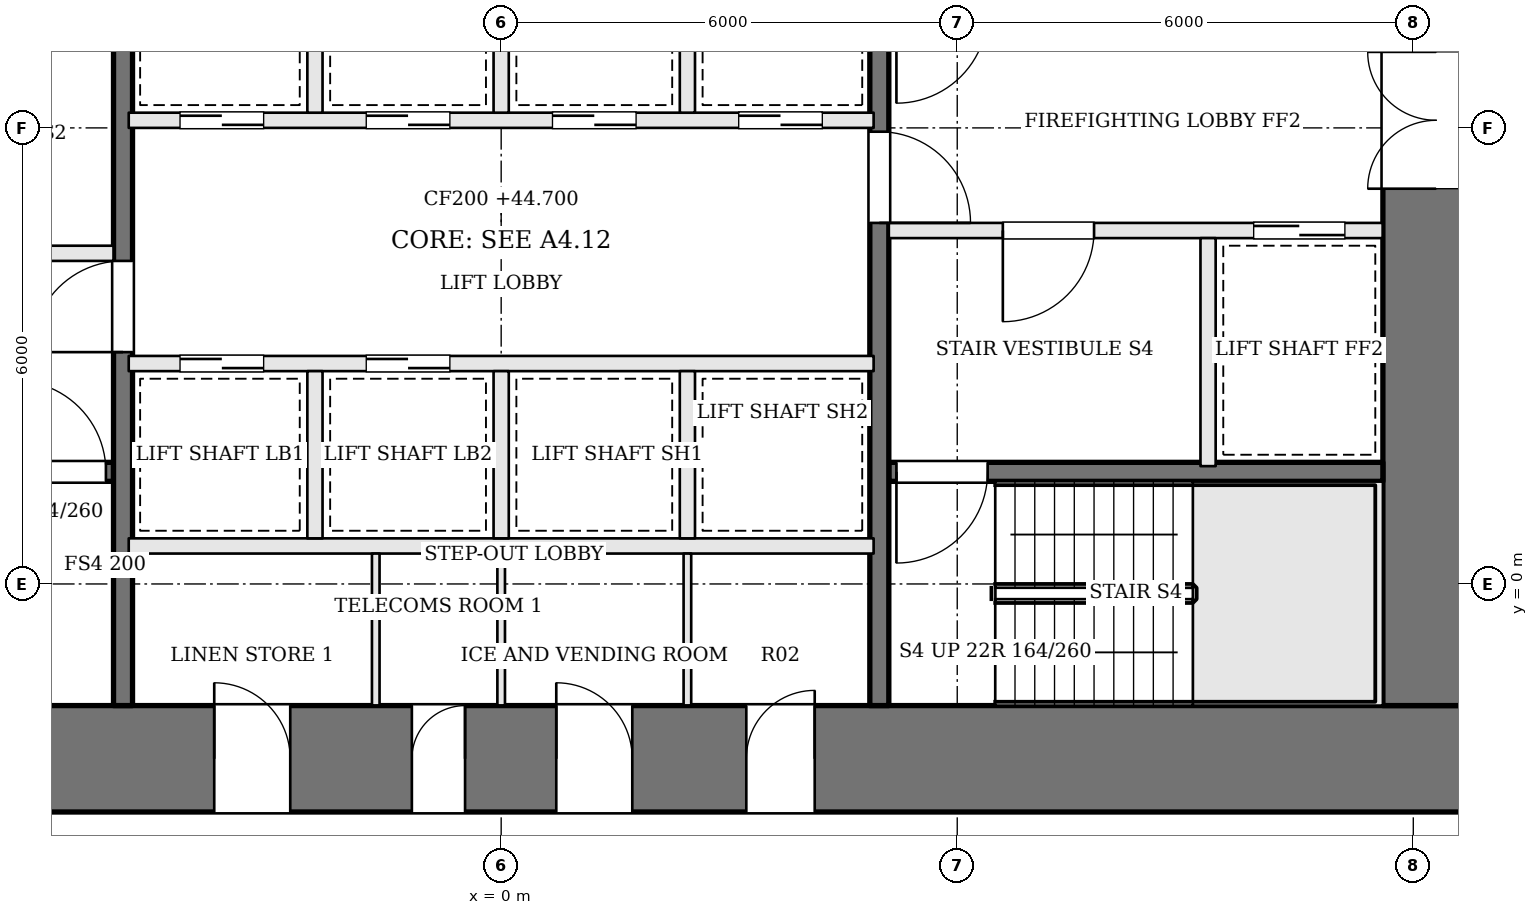
"""IFC4 building model, lengths in metres.
Left out: names, types, materials, properties, quantities, classifications, styles, units other than length and angle.
Written with IfcOpenShell. Run it as: python <this file> out.ifc"""

import sys

from ifc_helpers import new_model, si_unit, direction, frame, frame_2d, origin, place, context, subcontext, project, spatial, rectangle, extrude, element, fill, save


model = new_model("IFC4")
c1 = context("Model", 3, precision=1e-05, world=origin(), true_north=direction((0.0, 1.0)))
c2 = subcontext(c1, "Body", "Model", "MODEL_VIEW")
j1 = project(units=[si_unit("LENGTHUNIT", "METRE"), si_unit("PLANEANGLEUNIT", "RADIAN")], contexts=[c1])
p1 = place(None, origin())
s1 = spatial("IfcSite", under=j1, at=p1, CompositionType="ELEMENT")
p2 = place(p1, origin())
s2 = spatial("IfcBuilding", under=s1, at=p2, CompositionType="ELEMENT")
p3 = place(p2, frame((0.0, 0.0, 44.7)))
s3 = spatial("IfcBuildingStorey", under=s2, at=p3, CompositionType="ELEMENT", Elevation=44.7)
p4 = place(p3, frame((-13.0, -2.3, 0.0), z_axis=(0.0, 0.0, 1.0), x_axis=(1.0, 0.0, 0.0)))
e1 = element("IfcWall", 1, at=p4, inside=s3, PredefinedType="SHEAR", context=c2, shape_type="SweptSolid", body=[
    extrude(rectangle(XDim=26.0, YDim=1.4, at=frame_2d((13.0, 0.0))), origin(), (0.0, 0.0, 1.0), 3.6),
])
p5 = place(p4, frame((9.225, 0.0, 0.0)))
e2 = element("IfcOpeningElement", 2, at=p5, cuts=e1, PredefinedType="OPENING", context=c2, shape_type="SweptSolid", body=[
    extrude(rectangle(XDim=1.0, YDim=2.1, at=frame_2d((0.5, 1.05))), frame((0.0, 0.71, 0.0), z_axis=(0.0, -1.0, 0.0), x_axis=(1.0, 0.0, 0.0)), (0.0, 0.0, 1.0), 1.42),
])
p6 = place(p4, frame((11.825, 0.0, 0.0)))
e3 = element("IfcOpeningElement", 3, at=p6, cuts=e1, PredefinedType="OPENING", context=c2, shape_type="SweptSolid", body=[
    extrude(rectangle(XDim=0.7, YDim=2.1, at=frame_2d((0.35, 1.05))), frame((0.0, 0.71, 0.0), z_axis=(0.0, -1.0, 0.0), x_axis=(1.0, 0.0, 0.0)), (0.0, 0.0, 1.0), 1.42),
])
p7 = place(p4, frame((13.725, 0.0, 0.0)))
e4 = element("IfcOpeningElement", 4, at=p7, cuts=e1, PredefinedType="OPENING", context=c2, shape_type="SweptSolid", body=[
    extrude(rectangle(XDim=1.0, YDim=2.1, at=frame_2d((0.5, 1.05))), frame((0.0, 0.71, 0.0), z_axis=(0.0, -1.0, 0.0), x_axis=(1.0, 0.0, 0.0)), (0.0, 0.0, 1.0), 1.42),
])
p8 = place(p4, frame((16.225, 0.0, 0.0)))
e5 = element("IfcOpeningElement", 5, at=p8, cuts=e1, PredefinedType="OPENING", context=c2, shape_type="SweptSolid", body=[
    extrude(rectangle(XDim=0.9, YDim=2.1, at=frame_2d((0.45, 1.05))), frame((0.0, 0.71, 0.0), z_axis=(0.0, -1.0, 0.0), x_axis=(1.0, 0.0, 0.0)), (0.0, 0.0, 1.0), 1.42),
])
p9 = place(p3, frame((12.3, -1.6, 0.0), z_axis=(0.0, 0.0, 1.0), x_axis=(0.0, 1.0, 0.0)))
e6 = element("IfcWall", 6, at=p9, inside=s3, PredefinedType="SHEAR", context=c2, shape_type="SweptSolid", body=[
    extrude(rectangle(XDim=12.2, YDim=1.4, at=frame_2d((6.1, 0.0))), origin(), (0.0, 0.0, 1.0), 3.6),
])
p10 = place(p9, frame((6.8, 0.0, 0.0)))
e7 = element("IfcOpeningElement", 7, at=p10, cuts=e6, PredefinedType="OPENING", context=c2, shape_type="SweptSolid", body=[
    extrude(rectangle(XDim=1.8, YDim=2.1, at=frame_2d((0.9, 1.05))), frame((0.0, 0.71, 0.0), z_axis=(0.0, -1.0, 0.0), x_axis=(1.0, 0.0, 0.0)), (0.0, 0.0, 1.0), 1.42),
])
p11 = place(p3, frame((-11.6, 1.475, 0.0), z_axis=(0.0, 0.0, 1.0), x_axis=(1.0, 0.0, 0.0)))
e8 = element("IfcWall", 8, at=p11, inside=s3, PredefinedType="SOLIDWALL", context=c2, shape_type="SweptSolid", body=[
    extrude(rectangle(XDim=6.5, YDim=0.25, at=frame_2d((3.25, 0.0))), origin(), (0.0, 0.0, 1.0), 3.4),
])
p12 = place(p11, frame((5.2, 0.0, 0.0)))
e9 = element("IfcOpeningElement", 9, at=p12, cuts=e8, PredefinedType="OPENING", context=c2, shape_type="SweptSolid", body=[
    extrude(rectangle(XDim=1.2, YDim=2.1, at=frame_2d((0.6, 1.05))), frame((0.0, 0.135, 0.0), z_axis=(0.0, -1.0, 0.0), x_axis=(1.0, 0.0, 0.0)), (0.0, 0.0, 1.0), 0.27),
])
p13 = place(p3, frame((-11.6, 4.35, 0.0), z_axis=(0.0, 0.0, 1.0), x_axis=(1.0, 0.0, 0.0)))
e10 = element("IfcWall", 10, at=p13, inside=s3, PredefinedType="SOLIDWALL", context=c2, shape_type="SweptSolid", body=[
    extrude(rectangle(XDim=6.5, YDim=0.2, at=frame_2d((3.25, 0.0))), origin(), (0.0, 0.0, 1.0), 3.4),
])
p14 = place(p13, frame((3.8, 0.0, 0.0)))
e11 = element("IfcOpeningElement", 11, at=p14, cuts=e10, PredefinedType="OPENING", context=c2, shape_type="SweptSolid", body=[
    extrude(rectangle(XDim=1.2, YDim=2.1, at=frame_2d((0.6, 1.05))), frame((0.0, 0.11, 0.0), z_axis=(0.0, -1.0, 0.0), x_axis=(1.0, 0.0, 0.0)), (0.0, 0.0, 1.0), 0.22),
])
p15 = place(p13, frame((0.5, 0.0, 0.0)))
e12 = element("IfcOpeningElement", 12, at=p15, cuts=e10, PredefinedType="OPENING", context=c2, shape_type="SweptSolid", body=[
    extrude(rectangle(XDim=1.2, YDim=2.1, at=frame_2d((0.6, 1.05))), frame((0.0, 0.11, 0.0), z_axis=(0.0, -1.0, 0.0), x_axis=(1.0, 0.0, 0.0)), (0.0, 0.0, 1.0), 0.22),
])
p16 = place(p3, frame((11.6, 4.65, 0.0), z_axis=(0.0, 0.0, 1.0), x_axis=(-1.0, 0.0, 0.0)))
e13 = element("IfcWall", 13, at=p16, inside=s3, PredefinedType="SOLIDWALL", context=c2, shape_type="SweptSolid", body=[
    extrude(rectangle(XDim=6.5, YDim=0.2, at=frame_2d((3.25, 0.0))), origin(), (0.0, 0.0, 1.0), 3.4),
])
p17 = place(p16, frame((3.8, 0.0, 0.0)))
e14 = element("IfcOpeningElement", 14, at=p17, cuts=e13, PredefinedType="OPENING", context=c2, shape_type="SweptSolid", body=[
    extrude(rectangle(XDim=1.2, YDim=2.1, at=frame_2d((0.6, 1.05))), frame((0.0, 0.11, 0.0), z_axis=(0.0, -1.0, 0.0), x_axis=(1.0, 0.0, 0.0)), (0.0, 0.0, 1.0), 0.22),
])
p18 = place(p16, frame((0.5, 0.0, 0.0)))
e15 = element("IfcOpeningElement", 15, at=p18, cuts=e13, PredefinedType="OPENING", context=c2, shape_type="SweptSolid", body=[
    extrude(rectangle(XDim=1.2, YDim=2.1, at=frame_2d((0.6, 1.05))), frame((0.0, 0.11, 0.0), z_axis=(0.0, -1.0, 0.0), x_axis=(1.0, 0.0, 0.0)), (0.0, 0.0, 1.0), 0.22),
])
p19 = place(p3, frame((11.6, 1.475, 0.0), z_axis=(0.0, 0.0, 1.0), x_axis=(-1.0, 0.0, 0.0)))
e16 = element("IfcWall", 16, at=p19, inside=s3, PredefinedType="SOLIDWALL", context=c2, shape_type="SweptSolid", body=[
    extrude(rectangle(XDim=6.5, YDim=0.25, at=frame_2d((3.25, 0.0))), origin(), (0.0, 0.0, 1.0), 3.4),
])
p20 = place(p19, frame((5.2, 0.0, 0.0)))
e17 = element("IfcOpeningElement", 17, at=p20, cuts=e16, PredefinedType="OPENING", context=c2, shape_type="SweptSolid", body=[
    extrude(rectangle(XDim=1.2, YDim=2.1, at=frame_2d((0.6, 1.05))), frame((0.0, 0.135, 0.0), z_axis=(0.0, -1.0, 0.0), x_axis=(1.0, 0.0, 0.0)), (0.0, 0.0, 1.0), 0.27),
])
p21 = place(p3, frame((9.3, 4.55, 0.0), z_axis=(0.0, 0.0, 1.0), x_axis=(0.0, -1.0, 0.0)))
e18 = element("IfcWall", 18, at=p21, inside=s3, PredefinedType="SOLIDWALL", context=c2, shape_type="SweptSolid", body=[
    extrude(rectangle(XDim=3.0, YDim=0.2, at=frame_2d((1.5, 0.0))), origin(), (0.0, 0.0, 1.0), 3.4),
])
p22 = place(p3, frame((-4.975, -1.6, 0.0), z_axis=(0.0, 0.0, 1.0), x_axis=(0.0, 1.0, 0.0)))
e19 = element("IfcWall", 19, at=p22, inside=s3, PredefinedType="SOLIDWALL", context=c2, shape_type="SweptSolid", body=[
    extrude(rectangle(XDim=12.2, YDim=0.25, at=frame_2d((6.1, 0.0))), origin(), (0.0, 0.0, 1.0), 3.4),
])
p23 = place(p22, frame((4.65, 0.0, 0.0)))
e20 = element("IfcOpeningElement", 20, at=p23, cuts=e19, PredefinedType="OPENING", context=c2, shape_type="SweptSolid", body=[
    extrude(rectangle(XDim=1.2, YDim=2.1, at=frame_2d((0.6, 1.05))), frame((0.0, 0.135, 0.0), z_axis=(0.0, -1.0, 0.0), x_axis=(1.0, 0.0, 0.0)), (0.0, 0.0, 1.0), 0.27),
])
p24 = place(p3, frame((4.975, 10.6, 0.0), z_axis=(0.0, 0.0, 1.0), x_axis=(0.0, -1.0, 0.0)))
e21 = element("IfcWall", 21, at=p24, inside=s3, PredefinedType="SOLIDWALL", context=c2, shape_type="SweptSolid", body=[
    extrude(rectangle(XDim=12.2, YDim=0.25, at=frame_2d((6.1, 0.0))), origin(), (0.0, 0.0, 1.0), 3.4),
])
p25 = place(p24, frame((4.65, 0.0, 0.0)))
e22 = element("IfcOpeningElement", 22, at=p25, cuts=e21, PredefinedType="OPENING", context=c2, shape_type="SweptSolid", body=[
    extrude(rectangle(XDim=1.2, YDim=2.1, at=frame_2d((0.6, 1.05))), frame((0.0, 0.135, 0.0), z_axis=(0.0, -1.0, 0.0), x_axis=(1.0, 0.0, 0.0)), (0.0, 0.0, 1.0), 0.27),
])
p26 = place(p3, frame((-4.9, 0.5, 0.0), z_axis=(0.0, 0.0, 1.0), x_axis=(1.0, 0.0, 0.0)))
e23 = element("IfcWall", 23, at=p26, inside=s3, PredefinedType="SOLIDWALL", context=c2, shape_type="SweptSolid", body=[
    extrude(rectangle(XDim=9.8, YDim=0.2, at=frame_2d((4.9, 0.0))), origin(), (0.0, 0.0, 1.0), 3.4),
])
p27 = place(p3, frame((-4.9, 2.9, 0.0), z_axis=(0.0, 0.0, 1.0), x_axis=(1.0, 0.0, 0.0)))
e24 = element("IfcWall", 24, at=p27, inside=s3, PredefinedType="SOLIDWALL", context=c2, shape_type="SweptSolid", body=[
    extrude(rectangle(XDim=9.8, YDim=0.2, at=frame_2d((4.9, 0.0))), origin(), (0.0, 0.0, 1.0), 3.4),
])
p28 = place(p27, frame((0.675, 0.0, 0.0)))
e25 = element("IfcOpeningElement", 25, at=p28, cuts=e24, PredefinedType="OPENING", context=c2, shape_type="SweptSolid", body=[
    extrude(rectangle(XDim=1.1, YDim=2.1, at=frame_2d((0.55, 1.05))), frame((0.0, 0.11, 0.0), z_axis=(0.0, -1.0, 0.0), x_axis=(1.0, 0.0, 0.0)), (0.0, 0.0, 1.0), 0.22),
])
p29 = place(p27, frame((3.125, 0.0, 0.0)))
e26 = element("IfcOpeningElement", 26, at=p29, cuts=e24, PredefinedType="OPENING", context=c2, shape_type="SweptSolid", body=[
    extrude(rectangle(XDim=1.1, YDim=2.1, at=frame_2d((0.55, 1.05))), frame((0.0, 0.11, 0.0), z_axis=(0.0, -1.0, 0.0), x_axis=(1.0, 0.0, 0.0)), (0.0, 0.0, 1.0), 0.22),
])
p30 = place(p3, frame((-4.9, 6.1, 0.0), z_axis=(0.0, 0.0, 1.0), x_axis=(1.0, 0.0, 0.0)))
e27 = element("IfcWall", 27, at=p30, inside=s3, PredefinedType="SOLIDWALL", context=c2, shape_type="SweptSolid", body=[
    extrude(rectangle(XDim=9.8, YDim=0.2, at=frame_2d((4.9, 0.0))), origin(), (0.0, 0.0, 1.0), 3.4),
])
p31 = place(p30, frame((0.675, 0.0, 0.0)))
e28 = element("IfcOpeningElement", 28, at=p31, cuts=e27, PredefinedType="OPENING", context=c2, shape_type="SweptSolid", body=[
    extrude(rectangle(XDim=1.1, YDim=2.1, at=frame_2d((0.55, 1.05))), frame((0.0, 0.11, 0.0), z_axis=(0.0, -1.0, 0.0), x_axis=(1.0, 0.0, 0.0)), (0.0, 0.0, 1.0), 0.22),
])
p32 = place(p30, frame((3.125, 0.0, 0.0)))
e29 = element("IfcOpeningElement", 29, at=p32, cuts=e27, PredefinedType="OPENING", context=c2, shape_type="SweptSolid", body=[
    extrude(rectangle(XDim=1.1, YDim=2.1, at=frame_2d((0.55, 1.05))), frame((0.0, 0.11, 0.0), z_axis=(0.0, -1.0, 0.0), x_axis=(1.0, 0.0, 0.0)), (0.0, 0.0, 1.0), 0.22),
])
p33 = place(p30, frame((5.575, 0.0, 0.0)))
e30 = element("IfcOpeningElement", 30, at=p33, cuts=e27, PredefinedType="OPENING", context=c2, shape_type="SweptSolid", body=[
    extrude(rectangle(XDim=1.1, YDim=2.1, at=frame_2d((0.55, 1.05))), frame((0.0, 0.11, 0.0), z_axis=(0.0, -1.0, 0.0), x_axis=(1.0, 0.0, 0.0)), (0.0, 0.0, 1.0), 0.22),
])
p34 = place(p30, frame((8.025, 0.0, 0.0)))
e31 = element("IfcOpeningElement", 31, at=p34, cuts=e27, PredefinedType="OPENING", context=c2, shape_type="SweptSolid", body=[
    extrude(rectangle(XDim=1.1, YDim=2.1, at=frame_2d((0.55, 1.05))), frame((0.0, 0.11, 0.0), z_axis=(0.0, -1.0, 0.0), x_axis=(1.0, 0.0, 0.0)), (0.0, 0.0, 1.0), 0.22),
])
for number, where, z_axis, x_axis in (
    (32, (-2.45, 0.6, 0.0), (0.0, 0.0, 1.0), (0.0, 1.0, 0.0)),
    (33, (0.0, 0.6, 0.0), (0.0, 0.0, 1.0), (0.0, 1.0, 0.0)),
    (34, (2.45, 0.6, 0.0), (0.0, 0.0, 1.0), (0.0, 1.0, 0.0)),
    (35, (-2.45, 6.2, 0.0), (0.0, 0.0, 1.0), (0.0, 1.0, 0.0)),
    (36, (0.0, 6.2, 0.0), (0.0, 0.0, 1.0), (0.0, 1.0, 0.0)),
    (37, (2.45, 6.2, 0.0), (0.0, 0.0, 1.0), (0.0, 1.0, 0.0)),
):
    element("IfcWall", number, at=place(p3, frame(where, z_axis=z_axis, x_axis=x_axis)), inside=s3, PredefinedType="SOLIDWALL", context=c2, shape_type="SweptSolid", body=[
        extrude(rectangle(XDim=2.2, YDim=0.2, at=frame_2d((1.1, 0.0))), origin(), (0.0, 0.0, 1.0), 3.4),
    ])
for number, where, z_axis, x_axis in (
    (38, (-1.65, -1.6, 0.0), (0.0, 0.0, 1.0), (0.0, 1.0, 0.0)),
    (39, (0.0, -1.6, 0.0), (0.0, 0.0, 1.0), (0.0, 1.0, 0.0)),
    (40, (2.45, -1.6, 0.0), (0.0, 0.0, 1.0), (0.0, 1.0, 0.0)),
):
    element("IfcWall", number, at=place(p3, frame(where, z_axis=z_axis, x_axis=x_axis)), inside=s3, PredefinedType="PARTITIONING", context=c2, shape_type="SweptSolid", body=[
        extrude(rectangle(XDim=2.0, YDim=0.1, at=frame_2d((1.0, 0.0))), origin(), (0.0, 0.0, 1.0), 3.4),
    ])
p35 = place(p10, origin())
e41 = element("IfcDoor", 41, at=p35, inside=s3, OperationType="DOUBLE_DOOR_SINGLE_SWING", PredefinedType="DOOR", context=c2, shape_type="SweptSolid", body=[
    extrude(rectangle(XDim=1.8, YDim=2.1, at=frame_2d((0.9, 1.05))), frame((0.0, 0.025, 0.0), z_axis=(0.0, -1.0, 0.0), x_axis=(1.0, 0.0, 0.0)), (0.0, 0.0, 1.0), 0.05),
])
fill(e7, e41)
p36 = place(p23, origin())
e42 = element("IfcDoor", 42, at=p36, inside=s3, OperationType="SINGLE_SWING_LEFT", PredefinedType="DOOR", context=c2, shape_type="SweptSolid", body=[
    extrude(rectangle(XDim=1.2, YDim=2.1, at=frame_2d((0.6, 1.05))), frame((0.0, 0.025, 0.0), z_axis=(0.0, -1.0, 0.0), x_axis=(1.0, 0.0, 0.0)), (0.0, 0.0, 1.0), 0.05),
])
fill(e20, e42)
p37 = place(p25, origin())
e43 = element("IfcDoor", 43, at=p37, inside=s3, OperationType="SINGLE_SWING_RIGHT", PredefinedType="DOOR", context=c2, shape_type="SweptSolid", body=[
    extrude(rectangle(XDim=1.2, YDim=2.1, at=frame_2d((0.6, 1.05))), frame((0.0, 0.025, 0.0), z_axis=(0.0, -1.0, 0.0), x_axis=(1.0, 0.0, 0.0)), (0.0, 0.0, 1.0), 0.05),
])
fill(e22, e43)
p38 = place(p17, origin())
e44 = element("IfcDoor", 44, at=p38, inside=s3, OperationType="SINGLE_SWING_RIGHT", PredefinedType="DOOR", context=c2, shape_type="SweptSolid", body=[
    extrude(rectangle(XDim=1.2, YDim=2.1, at=frame_2d((0.6, 1.05))), frame((0.0, 0.025, 0.0), z_axis=(0.0, -1.0, 0.0), x_axis=(1.0, 0.0, 0.0)), (0.0, 0.0, 1.0), 0.05),
])
fill(e14, e44)
p39 = place(p12, origin())
e45 = element("IfcDoor", 45, at=p39, inside=s3, OperationType="SINGLE_SWING_LEFT", PredefinedType="DOOR", context=c2, shape_type="SweptSolid", body=[
    extrude(rectangle(XDim=1.2, YDim=2.1, at=frame_2d((0.6, 1.05))), frame((0.0, 0.025, 0.0), z_axis=(0.0, -1.0, 0.0), x_axis=(1.0, 0.0, 0.0)), (0.0, 0.0, 1.0), 0.05),
])
fill(e9, e45)
p40 = place(p20, origin())
e46 = element("IfcDoor", 46, at=p40, inside=s3, OperationType="SINGLE_SWING_RIGHT", PredefinedType="DOOR", context=c2, shape_type="SweptSolid", body=[
    extrude(rectangle(XDim=1.2, YDim=2.1, at=frame_2d((0.6, 1.05))), frame((0.0, 0.025, 0.0), z_axis=(0.0, -1.0, 0.0), x_axis=(1.0, 0.0, 0.0)), (0.0, 0.0, 1.0), 0.05),
])
fill(e17, e46)
p41 = place(p18, origin())
e47 = element("IfcDoor", 47, at=p41, inside=s3, OperationType="SLIDING_TO_RIGHT", PredefinedType="DOOR", context=c2, shape_type="SweptSolid", body=[
    extrude(rectangle(XDim=1.2, YDim=2.1, at=frame_2d((0.6, 1.05))), frame((0.0, 0.025, 0.0), z_axis=(0.0, -1.0, 0.0), x_axis=(1.0, 0.0, 0.0)), (0.0, 0.0, 1.0), 0.05),
])
fill(e15, e47)
p42 = place(p28, origin())
e48 = element("IfcDoor", 48, at=p42, inside=s3, OperationType="SLIDING_TO_RIGHT", PredefinedType="DOOR", context=c2, shape_type="SweptSolid", body=[
    extrude(rectangle(XDim=1.1, YDim=2.1, at=frame_2d((0.55, 1.05))), frame((0.0, 0.025, 0.0), z_axis=(0.0, -1.0, 0.0), x_axis=(1.0, 0.0, 0.0)), (0.0, 0.0, 1.0), 0.05),
])
fill(e25, e48)
p43 = place(p29, origin())
e49 = element("IfcDoor", 49, at=p43, inside=s3, OperationType="SLIDING_TO_LEFT", PredefinedType="DOOR", context=c2, shape_type="SweptSolid", body=[
    extrude(rectangle(XDim=1.1, YDim=2.1, at=frame_2d((0.55, 1.05))), frame((0.0, 0.025, 0.0), z_axis=(0.0, -1.0, 0.0), x_axis=(1.0, 0.0, 0.0)), (0.0, 0.0, 1.0), 0.05),
])
fill(e26, e49)
p44 = place(p31, origin())
e50 = element("IfcDoor", 50, at=p44, inside=s3, OperationType="SLIDING_TO_RIGHT", PredefinedType="DOOR", context=c2, shape_type="SweptSolid", body=[
    extrude(rectangle(XDim=1.1, YDim=2.1, at=frame_2d((0.55, 1.05))), frame((0.0, 0.025, 0.0), z_axis=(0.0, -1.0, 0.0), x_axis=(1.0, 0.0, 0.0)), (0.0, 0.0, 1.0), 0.05),
])
fill(e28, e50)
p45 = place(p32, origin())
e51 = element("IfcDoor", 51, at=p45, inside=s3, OperationType="SLIDING_TO_LEFT", PredefinedType="DOOR", context=c2, shape_type="SweptSolid", body=[
    extrude(rectangle(XDim=1.1, YDim=2.1, at=frame_2d((0.55, 1.05))), frame((0.0, 0.025, 0.0), z_axis=(0.0, -1.0, 0.0), x_axis=(1.0, 0.0, 0.0)), (0.0, 0.0, 1.0), 0.05),
])
fill(e29, e51)
p46 = place(p33, origin())
e52 = element("IfcDoor", 52, at=p46, inside=s3, OperationType="SLIDING_TO_RIGHT", PredefinedType="DOOR", context=c2, shape_type="SweptSolid", body=[
    extrude(rectangle(XDim=1.1, YDim=2.1, at=frame_2d((0.55, 1.05))), frame((0.0, 0.025, 0.0), z_axis=(0.0, -1.0, 0.0), x_axis=(1.0, 0.0, 0.0)), (0.0, 0.0, 1.0), 0.05),
])
fill(e30, e52)
p47 = place(p34, origin())
e53 = element("IfcDoor", 53, at=p47, inside=s3, OperationType="SLIDING_TO_LEFT", PredefinedType="DOOR", context=c2, shape_type="SweptSolid", body=[
    extrude(rectangle(XDim=1.1, YDim=2.1, at=frame_2d((0.55, 1.05))), frame((0.0, 0.025, 0.0), z_axis=(0.0, -1.0, 0.0), x_axis=(1.0, 0.0, 0.0)), (0.0, 0.0, 1.0), 0.05),
])
fill(e31, e53)
p48 = place(p5, origin())
e54 = element("IfcDoor", 54, at=p48, inside=s3, OperationType="SINGLE_SWING_LEFT", PredefinedType="DOOR", context=c2, shape_type="SweptSolid", body=[
    extrude(rectangle(XDim=1.0, YDim=2.1, at=frame_2d((0.5, 1.05))), frame((0.0, 0.025, 0.0), z_axis=(0.0, -1.0, 0.0), x_axis=(1.0, 0.0, 0.0)), (0.0, 0.0, 1.0), 0.05),
])
fill(e2, e54)
p49 = place(p6, origin())
e55 = element("IfcDoor", 55, at=p49, inside=s3, OperationType="SINGLE_SWING_RIGHT", PredefinedType="DOOR", context=c2, shape_type="SweptSolid", body=[
    extrude(rectangle(XDim=0.7, YDim=2.1, at=frame_2d((0.35, 1.05))), frame((0.0, 0.025, 0.0), z_axis=(0.0, -1.0, 0.0), x_axis=(1.0, 0.0, 0.0)), (0.0, 0.0, 1.0), 0.05),
])
fill(e3, e55)
p50 = place(p7, origin())
e56 = element("IfcDoor", 56, at=p50, inside=s3, OperationType="SINGLE_SWING_LEFT", PredefinedType="DOOR", context=c2, shape_type="SweptSolid", body=[
    extrude(rectangle(XDim=1.0, YDim=2.1, at=frame_2d((0.5, 1.05))), frame((0.0, 0.025, 0.0), z_axis=(0.0, -1.0, 0.0), x_axis=(1.0, 0.0, 0.0)), (0.0, 0.0, 1.0), 0.05),
])
fill(e4, e56)
p51 = place(p8, origin())
e57 = element("IfcDoor", 57, at=p51, inside=s3, OperationType="SINGLE_SWING_RIGHT", PredefinedType="DOOR", context=c2, shape_type="SweptSolid", body=[
    extrude(rectangle(XDim=0.9, YDim=2.1, at=frame_2d((0.45, 1.05))), frame((0.0, 0.025, 0.0), z_axis=(0.0, -1.0, 0.0), x_axis=(1.0, 0.0, 0.0)), (0.0, 0.0, 1.0), 0.05),
])
fill(e5, e57)
save(model, sys.argv[1])
